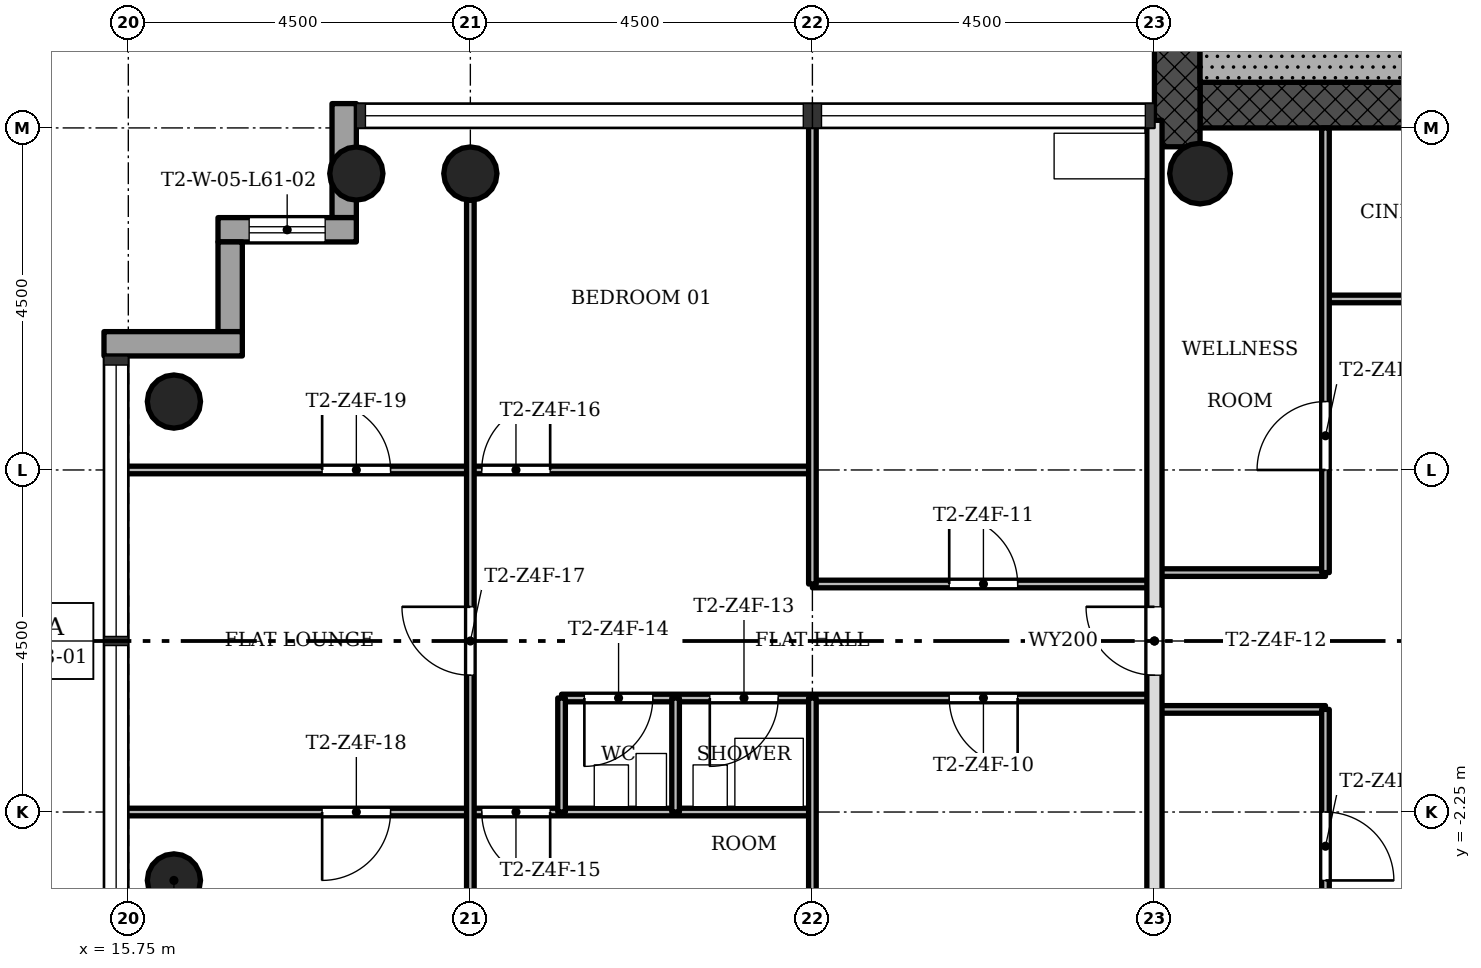
"""IFC4 building model, lengths in metres.
Left out: names, types, materials, properties, quantities, classifications, styles, units other than length and angle.
Written with IfcOpenShell. Run it as: python <this file> out.ifc"""

import sys

from ifc_helpers import new_model, si_unit, direction, frame, frame_2d, origin, origin_2d, place, context, subcontext, project, spatial, rectangle, hollow_circle, extrude, element, fill, save


model = new_model("IFC4")
c1 = context("Model", 3, precision=1e-05, world=origin(), true_north=direction((0.0, 1.0)))
c2 = subcontext(c1, "Body", "Model", "MODEL_VIEW")
j1 = project(units=[si_unit("LENGTHUNIT", "METRE"), si_unit("PLANEANGLEUNIT", "RADIAN")], contexts=[c1])
p1 = place(None, origin())
s1 = spatial("IfcSite", under=j1, at=p1, CompositionType="ELEMENT")
p2 = place(p1, origin())
s2 = spatial("IfcBuilding", under=s1, at=p2, CompositionType="ELEMENT")
p3 = place(p2, frame((0.0, 0.0, 219.8)))
s3 = spatial("IfcBuildingStorey", under=s2, at=p3, CompositionType="ELEMENT", Elevation=219.8)
p4 = place(p3, frame((29.85, 7.05, 0.0), z_axis=(0.0, 0.0, 1.0), x_axis=(1.0, 0.0, 0.0)))
e1 = element("IfcWall", 1, at=p4, inside=s3, PredefinedType="SHEAR", context=c2, shape_type="SweptSolid", body=[
    extrude(rectangle(XDim=12.9, YDim=0.6, at=frame_2d((6.45, 0.0))), origin(), (0.0, 0.0, 1.0), 3.4),
])
p5 = place(p4, frame((5.25, 0.0, 0.0)))
e2 = element("IfcOpeningElement", 2, at=p5, cuts=e1, PredefinedType="OPENING", context=c2, shape_type="SweptSolid", body=[
    extrude(rectangle(XDim=1.8, YDim=2.1, at=frame_2d((0.9, 1.05))), frame((0.0, 0.31, 0.0), z_axis=(0.0, -1.0, 0.0), x_axis=(1.0, 0.0, 0.0)), (0.0, 0.0, 1.0), 0.62),
])
p6 = place(p3, frame((29.55, 15.15, 0.0), z_axis=(0.0, 0.0, 1.0), x_axis=(0.0, -1.0, 0.0)))
e3 = element("IfcWall", 3, at=p6, inside=s3, PredefinedType="SHEAR", context=c2, shape_type="SweptSolid", body=[
    extrude(rectangle(XDim=8.648, YDim=0.6, at=frame_2d((4.324, 0.0))), origin(), (0.0, 0.0, 1.0), 3.4),
])
for number, where, z_axis, x_axis in (
    (4, (20.25, 6.15, 0.0), (0.0, 0.0, 1.0), (1.0, 0.0, 0.0)),
    (5, (18.75, 6.15, 0.0), (0.0, 0.0, 1.0), (1.0, 0.0, 0.0)),
    (6, (16.35, 3.15, 0.0), (0.0, 0.0, 1.0), (1.0, 0.0, 0.0)),
    (7, (16.35, -3.15, 0.0), (0.0, 0.0, 1.0), (1.0, 0.0, 0.0)),
):
    element("IfcColumn", number, at=place(p3, frame(where, z_axis=z_axis, x_axis=x_axis)), inside=s3, PredefinedType="COLUMN", context=c2, shape_type="SweptSolid", body=[
        extrude(hollow_circle(Radius=0.35, WallThickness=0.025, at=origin_2d()), origin(), (0.0, 0.0, 1.0), 3.4),
    ])
p7 = place(p3, frame((29.85, 6.15, 0.0), z_axis=(0.0, 0.0, 1.0), x_axis=(1.0, 0.0, 0.0)))
e8 = element("IfcColumn", 8, at=p7, inside=s3, PredefinedType="COLUMN", context=c2, shape_type="SweptSolid", body=[
    extrude(hollow_circle(Radius=0.4, WallThickness=0.028, at=origin_2d()), origin(), (0.0, 0.0, 1.0), 3.4),
])
p8 = place(p3, frame((18.59, 7.07, -0.3), z_axis=(0.0, 0.0, 1.0), x_axis=(0.0, -1.0, 0.0)))
e9 = element("IfcWall", 9, at=p8, inside=s3, PredefinedType="STANDARD", context=c2, shape_type="SweptSolid", body=[
    extrude(rectangle(XDim=1.5, YDim=0.32, at=frame_2d((0.75, 0.0))), origin(), (0.0, 0.0, 1.0), 3.4),
])
p9 = place(p3, frame((18.75, 5.41, -0.3), z_axis=(0.0, 0.0, 1.0), x_axis=(-1.0, 0.0, 0.0)))
e10 = element("IfcWall", 10, at=p9, inside=s3, PredefinedType="STANDARD", context=c2, shape_type="SweptSolid", body=[
    extrude(rectangle(XDim=1.82, YDim=0.32, at=frame_2d((0.91, 0.0))), origin(), (0.0, 0.0, 1.0), 3.4),
])
p10 = place(p9, frame((0.41, 0.0, 1.2)))
e11 = element("IfcOpeningElement", 11, at=p10, cuts=e10, PredefinedType="OPENING", context=c2, shape_type="SweptSolid", body=[
    extrude(rectangle(XDim=1.0, YDim=1.5, at=frame_2d((0.5, 0.75))), frame((0.0, 0.17, 0.0), z_axis=(0.0, -1.0, 0.0), x_axis=(1.0, 0.0, 0.0)), (0.0, 0.0, 1.0), 0.34),
])
p11 = place(p3, frame((17.09, 5.25, -0.3), z_axis=(0.0, 0.0, 1.0), x_axis=(0.0, -1.0, 0.0)))
e12 = element("IfcWall", 12, at=p11, inside=s3, PredefinedType="STANDARD", context=c2, shape_type="SweptSolid", body=[
    extrude(rectangle(XDim=1.18, YDim=0.32, at=frame_2d((0.59, 0.0))), origin(), (0.0, 0.0, 1.0), 3.4),
])
p12 = place(p3, frame((17.25, 3.91, -0.3), z_axis=(0.0, 0.0, 1.0), x_axis=(-1.0, 0.0, 0.0)))
e13 = element("IfcWall", 13, at=p12, inside=s3, PredefinedType="STANDARD", context=c2, shape_type="SweptSolid", body=[
    extrude(rectangle(XDim=1.82, YDim=0.32, at=frame_2d((0.91, 0.0))), origin(), (0.0, 0.0, 1.0), 3.4),
])
p13 = place(p3, frame((24.75, -2.25, 0.0), z_axis=(0.0, 0.0, 1.0), x_axis=(-1.0, 0.0, 0.0)))
e14 = element("IfcWall", 14, at=p13, inside=s3, PredefinedType="PARTITIONING", context=c2, shape_type="SweptSolid", body=[
    extrude(rectangle(XDim=9.1, YDim=0.1, at=frame_2d((4.55, 0.0))), origin(), (0.0, 0.0, 1.0), 3.0),
])
p14 = place(p13, frame((3.45, 0.0, 0.0)))
e15 = element("IfcOpeningElement", 15, at=p14, cuts=e14, PredefinedType="OPENING", context=c2, shape_type="SweptSolid", body=[
    extrude(rectangle(XDim=0.9, YDim=2.1, at=frame_2d((0.45, 1.05))), frame((0.0, 0.06, 0.0), z_axis=(0.0, -1.0, 0.0), x_axis=(1.0, 0.0, 0.0)), (0.0, 0.0, 1.0), 0.12),
])
p15 = place(p13, frame((5.55, 0.0, 0.0)))
e16 = element("IfcOpeningElement", 16, at=p15, cuts=e14, PredefinedType="OPENING", context=c2, shape_type="SweptSolid", body=[
    extrude(rectangle(XDim=0.9, YDim=2.1, at=frame_2d((0.45, 1.05))), frame((0.0, 0.06, 0.0), z_axis=(0.0, -1.0, 0.0), x_axis=(1.0, 0.0, 0.0)), (0.0, 0.0, 1.0), 0.12),
])
p16 = place(p3, frame((31.5, -0.9, 0.0), z_axis=(0.0, 0.0, 1.0), x_axis=(-1.0, 0.0, 0.0)))
e17 = element("IfcWall", 17, at=p16, inside=s3, PredefinedType="PARTITIONING", context=c2, shape_type="SweptSolid", body=[
    extrude(rectangle(XDim=2.25, YDim=0.1, at=frame_2d((1.125, 0.0))), origin(), (0.0, 0.0, 1.0), 3.0),
])
p17 = place(p3, frame((29.25, -0.75, 0.0), z_axis=(0.0, 0.0, 1.0), x_axis=(-1.0, 0.0, 0.0)))
e18 = element("IfcWall", 18, at=p17, inside=s3, PredefinedType="PARTITIONING", context=c2, shape_type="SweptSolid", body=[
    extrude(rectangle(XDim=7.8, YDim=0.1, at=frame_2d((3.9, 0.0))), origin(), (0.0, 0.0, 1.0), 3.0),
])
p18 = place(p17, frame((1.8, 0.0, 0.0)))
e19 = element("IfcOpeningElement", 19, at=p18, cuts=e18, PredefinedType="OPENING", context=c2, shape_type="SweptSolid", body=[
    extrude(rectangle(XDim=0.9, YDim=2.1, at=frame_2d((0.45, 1.05))), frame((0.0, 0.06, 0.0), z_axis=(0.0, -1.0, 0.0), x_axis=(1.0, 0.0, 0.0)), (0.0, 0.0, 1.0), 0.12),
])
p19 = place(p17, frame((4.95, 0.0, 0.0)))
e20 = element("IfcOpeningElement", 20, at=p19, cuts=e18, PredefinedType="OPENING", context=c2, shape_type="SweptSolid", body=[
    extrude(rectangle(XDim=0.9, YDim=2.1, at=frame_2d((0.45, 1.05))), frame((0.0, 0.06, 0.0), z_axis=(0.0, -1.0, 0.0), x_axis=(1.0, 0.0, 0.0)), (0.0, 0.0, 1.0), 0.12),
])
p20 = place(p17, frame((6.6, 0.0, 0.0)))
e21 = element("IfcOpeningElement", 21, at=p20, cuts=e18, PredefinedType="OPENING", context=c2, shape_type="SweptSolid", body=[
    extrude(rectangle(XDim=0.9, YDim=2.1, at=frame_2d((0.45, 1.05))), frame((0.0, 0.06, 0.0), z_axis=(0.0, -1.0, 0.0), x_axis=(1.0, 0.0, 0.0)), (0.0, 0.0, 1.0), 0.12),
])
p21 = place(p3, frame((29.25, 0.75, 0.0), z_axis=(0.0, 0.0, 1.0), x_axis=(-1.0, 0.0, 0.0)))
e22 = element("IfcWall", 22, at=p21, inside=s3, PredefinedType="PARTITIONING", context=c2, shape_type="SweptSolid", body=[
    extrude(rectangle(XDim=4.5, YDim=0.1, at=frame_2d((2.25, 0.0))), origin(), (0.0, 0.0, 1.0), 3.0),
])
p22 = place(p21, frame((1.8, 0.0, 0.0)))
e23 = element("IfcOpeningElement", 23, at=p22, cuts=e22, PredefinedType="OPENING", context=c2, shape_type="SweptSolid", body=[
    extrude(rectangle(XDim=0.9, YDim=2.1, at=frame_2d((0.45, 1.05))), frame((0.0, 0.06, 0.0), z_axis=(0.0, -1.0, 0.0), x_axis=(1.0, 0.0, 0.0)), (0.0, 0.0, 1.0), 0.12),
])
p23 = place(p3, frame((31.5, 0.9, 0.0), z_axis=(0.0, 0.0, 1.0), x_axis=(-1.0, 0.0, 0.0)))
e24 = element("IfcWall", 24, at=p23, inside=s3, PredefinedType="PARTITIONING", context=c2, shape_type="SweptSolid", body=[
    extrude(rectangle(XDim=2.25, YDim=0.1, at=frame_2d((1.125, 0.0))), origin(), (0.0, 0.0, 1.0), 3.0),
])
p24 = place(p3, frame((24.75, 2.25, 0.0), z_axis=(0.0, 0.0, 1.0), x_axis=(-1.0, 0.0, 0.0)))
e25 = element("IfcWall", 25, at=p24, inside=s3, PredefinedType="PARTITIONING", context=c2, shape_type="SweptSolid", body=[
    extrude(rectangle(XDim=9.1, YDim=0.1, at=frame_2d((4.55, 0.0))), origin(), (0.0, 0.0, 1.0), 3.0),
])
p25 = place(p24, frame((3.45, 0.0, 0.0)))
e26 = element("IfcOpeningElement", 26, at=p25, cuts=e25, PredefinedType="OPENING", context=c2, shape_type="SweptSolid", body=[
    extrude(rectangle(XDim=0.9, YDim=2.1, at=frame_2d((0.45, 1.05))), frame((0.0, 0.06, 0.0), z_axis=(0.0, -1.0, 0.0), x_axis=(1.0, 0.0, 0.0)), (0.0, 0.0, 1.0), 0.12),
])
p26 = place(p24, frame((5.55, 0.0, 0.0)))
e27 = element("IfcOpeningElement", 27, at=p26, cuts=e25, PredefinedType="OPENING", context=c2, shape_type="SweptSolid", body=[
    extrude(rectangle(XDim=0.9, YDim=2.1, at=frame_2d((0.45, 1.05))), frame((0.0, 0.06, 0.0), z_axis=(0.0, -1.0, 0.0), x_axis=(1.0, 0.0, 0.0)), (0.0, 0.0, 1.0), 0.12),
])
p27 = place(p3, frame((34.5, 4.5, 0.0), z_axis=(0.0, 0.0, 1.0), x_axis=(-1.0, 0.0, 0.0)))
e28 = element("IfcWall", 28, at=p27, inside=s3, PredefinedType="PARTITIONING", context=c2, shape_type="SweptSolid", body=[
    extrude(rectangle(XDim=3.0, YDim=0.1, at=frame_2d((1.5, 0.0))), origin(), (0.0, 0.0, 1.0), 3.0),
])
p28 = place(p27, frame((1.05, 0.0, 0.0)))
e29 = element("IfcOpeningElement", 29, at=p28, cuts=e28, PredefinedType="OPENING", context=c2, shape_type="SweptSolid", body=[
    extrude(rectangle(XDim=0.9, YDim=2.1, at=frame_2d((0.45, 1.05))), frame((0.0, 0.06, 0.0), z_axis=(0.0, -1.0, 0.0), x_axis=(1.0, 0.0, 0.0)), (0.0, 0.0, 1.0), 0.12),
])
p29 = place(p3, frame((31.5, -4.5, 0.0), z_axis=(0.0, 0.0, 1.0), x_axis=(0.0, 1.0, 0.0)))
e30 = element("IfcWall", 30, at=p29, inside=s3, PredefinedType="PARTITIONING", context=c2, shape_type="SweptSolid", body=[
    extrude(rectangle(XDim=3.6, YDim=0.1, at=frame_2d((1.8, 0.0))), origin(), (0.0, 0.0, 1.0), 3.0),
])
p30 = place(p29, frame((1.35, 0.0, 0.0)))
e31 = element("IfcOpeningElement", 31, at=p30, cuts=e30, PredefinedType="OPENING", context=c2, shape_type="SweptSolid", body=[
    extrude(rectangle(XDim=0.9, YDim=2.1, at=frame_2d((0.45, 1.05))), frame((0.0, 0.06, 0.0), z_axis=(0.0, -1.0, 0.0), x_axis=(1.0, 0.0, 0.0)), (0.0, 0.0, 1.0), 0.12),
])
p31 = place(p3, frame((31.5, 0.9, 0.0), z_axis=(0.0, 0.0, 1.0), x_axis=(0.0, 1.0, 0.0)))
e32 = element("IfcWall", 32, at=p31, inside=s3, PredefinedType="PARTITIONING", context=c2, shape_type="SweptSolid", body=[
    extrude(rectangle(XDim=5.85, YDim=0.1, at=frame_2d((2.925, 0.0))), origin(), (0.0, 0.0, 1.0), 3.0),
])
p32 = place(p31, frame((1.35, 0.0, 0.0)))
e33 = element("IfcOpeningElement", 33, at=p32, cuts=e32, PredefinedType="OPENING", context=c2, shape_type="SweptSolid", body=[
    extrude(rectangle(XDim=0.9, YDim=2.1, at=frame_2d((0.45, 1.05))), frame((0.0, 0.06, 0.0), z_axis=(0.0, -1.0, 0.0), x_axis=(1.0, 0.0, 0.0)), (0.0, 0.0, 1.0), 0.12),
])
p33 = place(p3, frame((29.25, -6.85, 0.0), z_axis=(0.0, 0.0, 1.0), x_axis=(0.0, 1.0, 0.0)))
e34 = element("IfcWall", 34, at=p33, inside=s3, PredefinedType="SOLIDWALL", context=c2, shape_type="SweptSolid", body=[
    extrude(rectangle(XDim=13.7, YDim=0.2, at=frame_2d((6.85, 0.0))), origin(), (0.0, 0.0, 1.0), 3.0),
])
p34 = place(p33, frame((6.4, 0.0, 0.0)))
e35 = element("IfcOpeningElement", 35, at=p34, cuts=e34, PredefinedType="OPENING", context=c2, shape_type="SweptSolid", body=[
    extrude(rectangle(XDim=0.9, YDim=2.1, at=frame_2d((0.45, 1.05))), frame((0.0, 0.11, 0.0), z_axis=(0.0, -1.0, 0.0), x_axis=(1.0, 0.0, 0.0)), (0.0, 0.0, 1.0), 0.22),
])
for number, where, z_axis, x_axis in (
    (36, (24.75, -6.85, 0.0), (0.0, 0.0, 1.0), (0.0, 1.0, 0.0)),
    (37, (24.75, 0.75, 0.0), (0.0, 0.0, 1.0), (0.0, 1.0, 0.0)),
):
    element("IfcWall", number, at=place(p3, frame(where, z_axis=z_axis, x_axis=x_axis)), inside=s3, PredefinedType="PARTITIONING", context=c2, shape_type="SweptSolid", body=[
        extrude(rectangle(XDim=6.1, YDim=0.1, at=frame_2d((3.05, 0.0))), origin(), (0.0, 0.0, 1.0), 3.0),
    ])
for number, where, z_axis, x_axis in (
    (38, (22.95, -2.25, 0.0), (0.0, 0.0, 1.0), (0.0, 1.0, 0.0)),
    (39, (21.45, -2.25, 0.0), (0.0, 0.0, 1.0), (0.0, 1.0, 0.0)),
):
    element("IfcWall", number, at=place(p3, frame(where, z_axis=z_axis, x_axis=x_axis)), inside=s3, PredefinedType="PARTITIONING", context=c2, shape_type="SweptSolid", body=[
        extrude(rectangle(XDim=1.5, YDim=0.1, at=frame_2d((0.75, 0.0))), origin(), (0.0, 0.0, 1.0), 3.0),
    ])
p35 = place(p3, frame((20.25, -5.8, 0.0), z_axis=(0.0, 0.0, 1.0), x_axis=(0.0, 1.0, 0.0)))
e40 = element("IfcWall", 40, at=p35, inside=s3, PredefinedType="PARTITIONING", context=c2, shape_type="SweptSolid", body=[
    extrude(rectangle(XDim=11.6, YDim=0.1, at=frame_2d((5.8, 0.0))), origin(), (0.0, 0.0, 1.0), 3.0),
])
p36 = place(p35, frame((5.35, 0.0, 0.0)))
e41 = element("IfcOpeningElement", 41, at=p36, cuts=e40, PredefinedType="OPENING", context=c2, shape_type="SweptSolid", body=[
    extrude(rectangle(XDim=0.9, YDim=2.1, at=frame_2d((0.45, 1.05))), frame((0.0, 0.06, 0.0), z_axis=(0.0, -1.0, 0.0), x_axis=(1.0, 0.0, 0.0)), (0.0, 0.0, 1.0), 0.12),
])
p37 = place(p3, frame((34.15, 7.65, 0.0), z_axis=(0.0, 0.0, 1.0), x_axis=(-1.0, 0.0, 0.0)))
e42 = element("IfcWall", 42, at=p37, inside=s3, PredefinedType="SHEAR", context=c2, shape_type="SweptSolid", body=[
    extrude(rectangle(XDim=4.3, YDim=0.6, at=frame_2d((2.15, 0.0))), origin(), (0.0, 0.0, 1.0), 3.4),
])
p38 = place(p32, origin())
e43 = element("IfcDoor", 43, at=p38, inside=s3, OperationType="SINGLE_SWING_RIGHT", PredefinedType="DOOR", context=c2, shape_type="SweptSolid", body=[
    extrude(rectangle(XDim=0.9, YDim=2.1, at=frame_2d((0.45, 1.05))), frame((0.0, 0.025, 0.0), z_axis=(0.0, -1.0, 0.0), x_axis=(1.0, 0.0, 0.0)), (0.0, 0.0, 1.0), 0.05),
])
fill(e33, e43)
p39 = place(p30, origin())
e44 = element("IfcDoor", 44, at=p39, inside=s3, OperationType="SINGLE_SWING_LEFT", PredefinedType="DOOR", context=c2, shape_type="SweptSolid", body=[
    extrude(rectangle(XDim=0.9, YDim=2.1, at=frame_2d((0.45, 1.05))), frame((0.0, 0.025, 0.0), z_axis=(0.0, -1.0, 0.0), x_axis=(1.0, 0.0, 0.0)), (0.0, 0.0, 1.0), 0.05),
])
fill(e31, e44)
p40 = place(p18, origin())
e45 = element("IfcDoor", 45, at=p40, inside=s3, OperationType="SINGLE_SWING_RIGHT", PredefinedType="DOOR", context=c2, shape_type="SweptSolid", body=[
    extrude(rectangle(XDim=0.9, YDim=2.1, at=frame_2d((0.45, 1.05))), frame((0.0, 0.025, 0.0), z_axis=(0.0, -1.0, 0.0), x_axis=(1.0, 0.0, 0.0)), (0.0, 0.0, 1.0), 0.05),
])
fill(e19, e45)
p41 = place(p22, origin())
e46 = element("IfcDoor", 46, at=p41, inside=s3, OperationType="SINGLE_SWING_RIGHT", PredefinedType="DOOR", context=c2, shape_type="SweptSolid", body=[
    extrude(rectangle(XDim=0.9, YDim=2.1, at=frame_2d((0.45, 1.05))), frame((0.0, 0.025, 0.0), z_axis=(0.0, -1.0, 0.0), x_axis=(1.0, 0.0, 0.0)), (0.0, 0.0, 1.0), 0.05),
])
fill(e23, e46)
p42 = place(p34, origin())
e47 = element("IfcDoor", 47, at=p42, inside=s3, OperationType="SINGLE_SWING_LEFT", PredefinedType="DOOR", context=c2, shape_type="SweptSolid", body=[
    extrude(rectangle(XDim=0.9, YDim=2.1, at=frame_2d((0.45, 1.05))), frame((0.0, 0.025, 0.0), z_axis=(0.0, -1.0, 0.0), x_axis=(1.0, 0.0, 0.0)), (0.0, 0.0, 1.0), 0.05),
])
fill(e35, e47)
p43 = place(p19, origin())
e48 = element("IfcDoor", 48, at=p43, inside=s3, OperationType="SINGLE_SWING_LEFT", PredefinedType="DOOR", context=c2, shape_type="SweptSolid", body=[
    extrude(rectangle(XDim=0.9, YDim=2.1, at=frame_2d((0.45, 1.05))), frame((0.0, 0.025, 0.0), z_axis=(0.0, -1.0, 0.0), x_axis=(1.0, 0.0, 0.0)), (0.0, 0.0, 1.0), 0.05),
])
fill(e20, e48)
p44 = place(p20, origin())
e49 = element("IfcDoor", 49, at=p44, inside=s3, OperationType="SINGLE_SWING_LEFT", PredefinedType="DOOR", context=c2, shape_type="SweptSolid", body=[
    extrude(rectangle(XDim=0.9, YDim=2.1, at=frame_2d((0.45, 1.05))), frame((0.0, 0.025, 0.0), z_axis=(0.0, -1.0, 0.0), x_axis=(1.0, 0.0, 0.0)), (0.0, 0.0, 1.0), 0.05),
])
fill(e21, e49)
p45 = place(p14, origin())
e50 = element("IfcDoor", 50, at=p45, inside=s3, OperationType="SINGLE_SWING_RIGHT", PredefinedType="DOOR", context=c2, shape_type="SweptSolid", body=[
    extrude(rectangle(XDim=0.9, YDim=2.1, at=frame_2d((0.45, 1.05))), frame((0.0, 0.025, 0.0), z_axis=(0.0, -1.0, 0.0), x_axis=(1.0, 0.0, 0.0)), (0.0, 0.0, 1.0), 0.05),
])
fill(e15, e50)
p46 = place(p25, origin())
e51 = element("IfcDoor", 51, at=p46, inside=s3, OperationType="SINGLE_SWING_LEFT", PredefinedType="DOOR", context=c2, shape_type="SweptSolid", body=[
    extrude(rectangle(XDim=0.9, YDim=2.1, at=frame_2d((0.45, 1.05))), frame((0.0, 0.025, 0.0), z_axis=(0.0, -1.0, 0.0), x_axis=(1.0, 0.0, 0.0)), (0.0, 0.0, 1.0), 0.05),
])
fill(e26, e51)
p47 = place(p36, origin())
e52 = element("IfcDoor", 52, at=p47, inside=s3, OperationType="SINGLE_SWING_LEFT", PredefinedType="DOOR", context=c2, shape_type="SweptSolid", body=[
    extrude(rectangle(XDim=0.9, YDim=2.1, at=frame_2d((0.45, 1.05))), frame((0.0, 0.025, 0.0), z_axis=(0.0, -1.0, 0.0), x_axis=(1.0, 0.0, 0.0)), (0.0, 0.0, 1.0), 0.05),
])
fill(e41, e52)
p48 = place(p15, origin())
e53 = element("IfcDoor", 53, at=p48, inside=s3, OperationType="SINGLE_SWING_LEFT", PredefinedType="DOOR", context=c2, shape_type="SweptSolid", body=[
    extrude(rectangle(XDim=0.9, YDim=2.1, at=frame_2d((0.45, 1.05))), frame((0.0, 0.025, 0.0), z_axis=(0.0, -1.0, 0.0), x_axis=(1.0, 0.0, 0.0)), (0.0, 0.0, 1.0), 0.05),
])
fill(e16, e53)
p49 = place(p26, origin())
e54 = element("IfcDoor", 54, at=p49, inside=s3, OperationType="SINGLE_SWING_RIGHT", PredefinedType="DOOR", context=c2, shape_type="SweptSolid", body=[
    extrude(rectangle(XDim=0.9, YDim=2.1, at=frame_2d((0.45, 1.05))), frame((0.0, 0.025, 0.0), z_axis=(0.0, -1.0, 0.0), x_axis=(1.0, 0.0, 0.0)), (0.0, 0.0, 1.0), 0.05),
])
fill(e27, e54)
p50 = place(p10, origin())
e55 = element("IfcWindow", 55, at=p50, inside=s3, PartitioningType="SINGLE_PANEL", PredefinedType="WINDOW", context=c2, shape_type="SweptSolid", body=[
    extrude(rectangle(XDim=1.0, YDim=1.5, at=frame_2d((0.5, 0.75))), frame((0.0, 0.03, 0.0), z_axis=(0.0, -1.0, 0.0), x_axis=(1.0, 0.0, 0.0)), (0.0, 0.0, 1.0), 0.06),
])
fill(e11, e55)
save(model, sys.argv[1])
